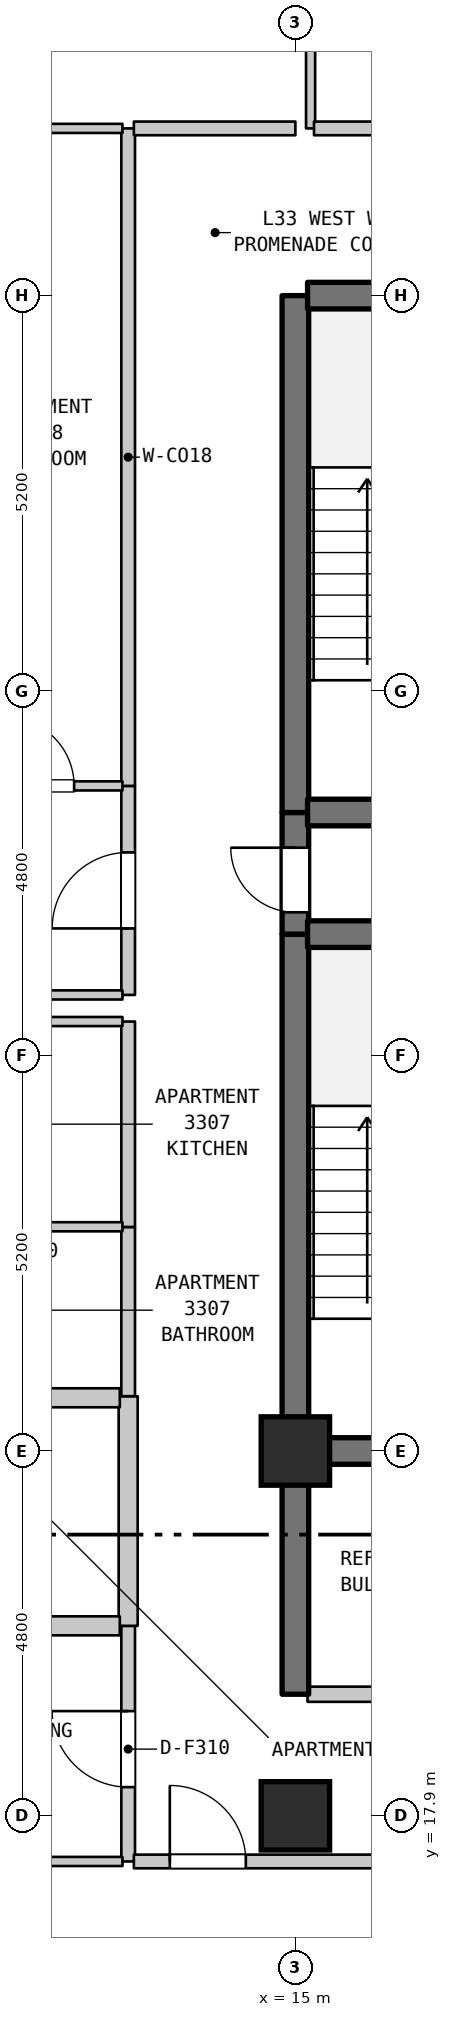
"""IFC4 building model, lengths in metres.
Left out: names, types, materials, properties, quantities, classifications, styles, units other than length and angle.
Written with IfcOpenShell. Run it as: python <this file> out.ifc"""

import sys

from ifc_helpers import new_model, si_unit, direction, frame, frame_2d, origin, origin_2d, place, context, subcontext, project, spatial, rectangle, extrude, element, fill, save


model = new_model("IFC4")
c1 = context("Model", 3, precision=1e-05, world=origin(), true_north=direction((0.0, 1.0)))
c2 = subcontext(c1, "Body", "Model", "MODEL_VIEW")
j1 = project(units=[si_unit("LENGTHUNIT", "METRE"), si_unit("PLANEANGLEUNIT", "RADIAN")], contexts=[c1])
p1 = place(None, origin())
s1 = spatial("IfcSite", under=j1, at=p1, CompositionType="ELEMENT")
p2 = place(p1, origin())
s2 = spatial("IfcBuilding", under=s1, at=p2, CompositionType="ELEMENT")
p3 = place(p2, frame((0.0, 0.0, 137.2)))
s3 = spatial("IfcBuildingStorey", under=s2, at=p3, CompositionType="ELEMENT", Elevation=137.2)
for number, where, z_axis, x_axis in (
    (1, (15.0, 17.9, 0.0), (0.0, 0.0, 1.0), (1.0, 0.0, 0.0)),
    (2, (15.0, 22.7, 0.0), (0.0, 0.0, 1.0), (1.0, 0.0, 0.0)),
):
    element("IfcColumn", number, at=place(p3, frame(where, z_axis=z_axis, x_axis=x_axis)), inside=s3, PredefinedType="COLUMN", context=c2, shape_type="SweptSolid", body=[
        extrude(rectangle(XDim=0.9, YDim=0.9, at=origin_2d()), origin(), (0.0, 0.0, 1.0), 3.7),
    ])
p4 = place(p3, frame((12.8, 17.3, 0.0), z_axis=(0.0, 0.0, 1.0), x_axis=(0.0, 1.0, 0.0)))
e3 = element("IfcWall", 3, at=p4, inside=s3, PredefinedType="STANDARD", context=c2, shape_type="SweptSolid", body=[
    extrude(rectangle(XDim=3.1, YDim=0.18, at=frame_2d((1.55, 0.0))), origin(), (0.0, 0.0, 1.0), 3.385),
])
p5 = place(p4, frame((0.978, 0.0, 0.0)))
e4 = element("IfcOpeningElement", 4, at=p5, cuts=e3, PredefinedType="OPENING", context=c2, shape_type="SweptSolid", body=[
    extrude(rectangle(XDim=1.0, YDim=2.15, at=frame_2d((0.5, 1.075))), frame((0.0, 0.1, 0.0), z_axis=(0.0, -1.0, 0.0), x_axis=(1.0, 0.0, 0.0)), (0.0, 0.0, 1.0), 0.2),
])
p6 = place(p3, frame((12.8, 20.4, 0.0), z_axis=(0.0, 0.0, 1.0), x_axis=(0.0, 1.0, 0.0)))
e5 = element("IfcWall", 5, at=p6, inside=s3, PredefinedType="STANDARD", context=c2, shape_type="SweptSolid", body=[
    extrude(rectangle(XDim=3.021, YDim=0.25, at=frame_2d((1.51, 0.0))), origin(), (0.0, 0.0, 1.0), 3.385),
])
p7 = place(p3, frame((12.8, 23.421, 0.0), z_axis=(0.0, 0.0, 1.0), x_axis=(0.0, 1.0, 0.0)))
e6 = element("IfcWall", 6, at=p7, inside=s3, PredefinedType="STANDARD", context=c2, shape_type="SweptSolid", body=[
    extrude(rectangle(XDim=2.226, YDim=0.18, at=frame_2d((1.113, 0.0))), origin(), (0.0, 0.0, 1.0), 3.385),
])
p8 = place(p3, frame((12.8, 25.647, 0.0), z_axis=(0.0, 0.0, 1.0), x_axis=(0.0, 1.0, 0.0)))
e7 = element("IfcWall", 7, at=p8, inside=s3, PredefinedType="STANDARD", context=c2, shape_type="SweptSolid", body=[
    extrude(rectangle(XDim=2.703, YDim=0.18, at=frame_2d((1.352, 0.0))), origin(), (0.0, 0.0, 1.0), 3.385),
])
p9 = place(p3, frame((12.8, 28.7, 0.0), z_axis=(0.0, 0.0, 1.0), x_axis=(0.0, 1.0, 0.0)))
e8 = element("IfcWall", 8, at=p9, inside=s3, PredefinedType="STANDARD", context=c2, shape_type="SweptSolid", body=[
    extrude(rectangle(XDim=2.75, YDim=0.18, at=frame_2d((1.375, 0.0))), origin(), (0.0, 0.0, 1.0), 3.385),
])
p10 = place(p9, frame((0.875, 0.0, 0.0)))
e9 = element("IfcOpeningElement", 9, at=p10, cuts=e8, PredefinedType="OPENING", context=c2, shape_type="SweptSolid", body=[
    extrude(rectangle(XDim=1.0, YDim=2.15, at=frame_2d((0.5, 1.075))), frame((0.0, 0.1, 0.0), z_axis=(0.0, -1.0, 0.0), x_axis=(1.0, 0.0, 0.0)), (0.0, 0.0, 1.0), 0.2),
])
p11 = place(p3, frame((12.8, 31.45, 0.0), z_axis=(0.0, 0.0, 1.0), x_axis=(0.0, 1.0, 0.0)))
e10 = element("IfcWall", 10, at=p11, inside=s3, PredefinedType="STANDARD", context=c2, shape_type="SweptSolid", body=[
    extrude(rectangle(XDim=8.65, YDim=0.18, at=frame_2d((4.325, 0.0))), origin(), (0.0, 0.0, 1.0), 3.385),
])
p12 = place(p3, frame((15.0, 19.5, 0.0), z_axis=(0.0, 0.0, 1.0), x_axis=(0.0, 1.0, 0.0)))
e11 = element("IfcWall", 11, at=p12, inside=s3, PredefinedType="SHEAR", context=c2, shape_type="SweptSolid", body=[
    extrude(rectangle(XDim=3.2, YDim=0.35, at=frame_2d((1.6, 0.0))), origin(), (0.0, 0.0, 1.0), 3.385),
])
p13 = place(p3, frame((15.0, 22.7, 0.0), z_axis=(0.0, 0.0, 1.0), x_axis=(0.0, 1.0, 0.0)))
e12 = element("IfcWall", 12, at=p13, inside=s3, PredefinedType="SHEAR", context=c2, shape_type="SweptSolid", body=[
    extrude(rectangle(XDim=6.8, YDim=0.35, at=frame_2d((3.4, 0.0))), origin(), (0.0, 0.0, 1.0), 3.385),
])
p14 = place(p3, frame((15.0, 29.5, 0.0), z_axis=(0.0, 0.0, 1.0), x_axis=(0.0, 1.0, 0.0)))
e13 = element("IfcWall", 13, at=p14, inside=s3, PredefinedType="SHEAR", context=c2, shape_type="SweptSolid", body=[
    extrude(rectangle(XDim=1.6, YDim=0.35, at=frame_2d((0.8, 0.0))), origin(), (0.0, 0.0, 1.0), 3.385),
])
p15 = place(p14, frame((0.287, 0.0, 0.0)))
e14 = element("IfcOpeningElement", 14, at=p15, cuts=e13, PredefinedType="OPENING", context=c2, shape_type="SweptSolid", body=[
    extrude(rectangle(XDim=0.85, YDim=2.1, at=frame_2d((0.425, 1.05))), frame((0.0, 0.185, 0.0), z_axis=(0.0, -1.0, 0.0), x_axis=(1.0, 0.0, 0.0)), (0.0, 0.0, 1.0), 0.37),
])
p16 = place(p3, frame((15.0, 31.1, 0.0), z_axis=(0.0, 0.0, 1.0), x_axis=(0.0, 1.0, 0.0)))
e15 = element("IfcWall", 15, at=p16, inside=s3, PredefinedType="SHEAR", context=c2, shape_type="SweptSolid", body=[
    extrude(rectangle(XDim=6.8, YDim=0.35, at=frame_2d((3.4, 0.0))), origin(), (0.0, 0.0, 1.0), 3.385),
])
p17 = place(p3, frame((15.2, 40.1, 0.0), z_axis=(0.0, 0.0, 1.0), x_axis=(0.0, 1.0, 0.0)))
e16 = element("IfcWall", 16, at=p17, inside=s3, PredefinedType="PARTITIONING", context=c2, shape_type="SweptSolid", body=[
    extrude(rectangle(XDim=3.2, YDim=0.12, at=frame_2d((1.6, 0.0))), origin(), (0.0, 0.0, 1.0), 3.385),
])
p18 = place(p3, frame((9.085, 17.3, 0.0), z_axis=(0.0, 0.0, 1.0), x_axis=(1.0, 0.0, 0.0)))
e17 = element("IfcWall", 17, at=p18, inside=s3, PredefinedType="PARTITIONING", context=c2, shape_type="SweptSolid", body=[
    extrude(rectangle(XDim=3.64, YDim=0.12, at=frame_2d((1.82, 0.0))), origin(), (0.0, 0.0, 1.0), 3.385),
])
p19 = place(p3, frame((12.875, 17.3, 0.0), z_axis=(0.0, 0.0, 1.0), x_axis=(1.0, 0.0, 0.0)))
e18 = element("IfcWall", 18, at=p19, inside=s3, PredefinedType="STANDARD", context=c2, shape_type="SweptSolid", body=[
    extrude(rectangle(XDim=3.58, YDim=0.18, at=frame_2d((1.79, 0.0))), origin(), (0.0, 0.0, 1.0), 3.385),
])
p20 = place(p19, frame((0.473, 0.0, 0.0)))
e19 = element("IfcOpeningElement", 19, at=p20, cuts=e18, PredefinedType="OPENING", context=c2, shape_type="SweptSolid", body=[
    extrude(rectangle(XDim=1.0, YDim=2.15, at=frame_2d((0.5, 1.075))), frame((0.0, 0.1, 0.0), z_axis=(0.0, -1.0, 0.0), x_axis=(1.0, 0.0, 0.0)), (0.0, 0.0, 1.0), 0.2),
])
p21 = place(p3, frame((15.16, 19.5, 0.0), z_axis=(0.0, 0.0, 1.0), x_axis=(1.0, 0.0, 0.0)))
e20 = element("IfcWall", 20, at=p21, inside=s3, PredefinedType="STANDARD", context=c2, shape_type="SweptSolid", body=[
    extrude(rectangle(XDim=3.68, YDim=0.2, at=frame_2d((1.84, 0.0))), origin(), (0.0, 0.0, 1.0), 3.385),
])
p22 = place(p21, frame((1.39, 0.0, 0.0)))
e21 = element("IfcOpeningElement", 21, at=p22, cuts=e20, PredefinedType="OPENING", context=c2, shape_type="SweptSolid", body=[
    extrude(rectangle(XDim=0.9, YDim=2.15, at=frame_2d((0.45, 1.075))), frame((0.0, 0.11, 0.0), z_axis=(0.0, -1.0, 0.0), x_axis=(1.0, 0.0, 0.0)), (0.0, 0.0, 1.0), 0.22),
])
p23 = place(p3, frame((10.66, 20.4, 0.0), z_axis=(0.0, 0.0, 1.0), x_axis=(1.0, 0.0, 0.0)))
e22 = element("IfcWall", 22, at=p23, inside=s3, PredefinedType="STANDARD", context=c2, shape_type="SweptSolid", body=[
    extrude(rectangle(XDim=2.03, YDim=0.25, at=frame_2d((1.015, 0.0))), origin(), (0.0, 0.0, 1.0), 3.385),
])
p24 = place(p3, frame((15.16, 22.7, 0.0), z_axis=(0.0, 0.0, 1.0), x_axis=(1.0, 0.0, 0.0)))
e23 = element("IfcWall", 23, at=p24, inside=s3, PredefinedType="SHEAR", context=c2, shape_type="SweptSolid", body=[
    extrude(rectangle(XDim=3.68, YDim=0.35, at=frame_2d((1.84, 0.0))), origin(), (0.0, 0.0, 1.0), 3.385),
])
p25 = place(p3, frame((10.66, 23.4, 0.0), z_axis=(0.0, 0.0, 1.0), x_axis=(1.0, 0.0, 0.0)))
e24 = element("IfcWall", 24, at=p25, inside=s3, PredefinedType="STANDARD", context=c2, shape_type="SweptSolid", body=[
    extrude(rectangle(XDim=2.03, YDim=0.25, at=frame_2d((1.015, 0.0))), origin(), (0.0, 0.0, 1.0), 3.385),
])
for number, where, z_axis, x_axis in (
    (25, (10.595, 25.65, 0.0), (0.0, 0.0, 1.0), (1.0, 0.0, 0.0)),
    (26, (10.595, 28.35, 0.0), (0.0, 0.0, 1.0), (1.0, 0.0, 0.0)),
):
    element("IfcWall", number, at=place(p3, frame(where, z_axis=z_axis, x_axis=x_axis)), inside=s3, PredefinedType="PARTITIONING", context=c2, shape_type="SweptSolid", body=[
        extrude(rectangle(XDim=2.13, YDim=0.12, at=frame_2d((1.065, 0.0))), origin(), (0.0, 0.0, 1.0), 3.385),
    ])
p26 = place(p3, frame((9.03, 28.7, 0.0), z_axis=(0.0, 0.0, 1.0), x_axis=(1.0, 0.0, 0.0)))
e27 = element("IfcWall", 27, at=p26, inside=s3, PredefinedType="PARTITIONING", context=c2, shape_type="SweptSolid", body=[
    extrude(rectangle(XDim=3.695, YDim=0.12, at=frame_2d((1.848, 0.0))), origin(), (0.0, 0.0, 1.0), 3.385),
])
for number, where, z_axis, x_axis in (
    (28, (15.16, 29.5, 0.0), (0.0, 0.0, 1.0), (1.0, 0.0, 0.0)),
    (29, (15.16, 31.1, 0.0), (0.0, 0.0, 1.0), (1.0, 0.0, 0.0)),
):
    element("IfcWall", number, at=place(p3, frame(where, z_axis=z_axis, x_axis=x_axis)), inside=s3, PredefinedType="SHEAR", context=c2, shape_type="SweptSolid", body=[
        extrude(rectangle(XDim=3.68, YDim=0.35, at=frame_2d((1.84, 0.0))), origin(), (0.0, 0.0, 1.0), 3.385),
    ])
p27 = place(p3, frame((10.523, 31.45, 0.0), z_axis=(0.0, 0.0, 1.0), x_axis=(1.0, 0.0, 0.0)))
e30 = element("IfcWall", 30, at=p27, inside=s3, PredefinedType="PARTITIONING", context=c2, shape_type="SweptSolid", body=[
    extrude(rectangle(XDim=2.202, YDim=0.12, at=frame_2d((1.101, 0.0))), origin(), (0.0, 0.0, 1.0), 3.385),
])
p28 = place(p27, frame((0.666, 0.0, 0.0)))
e31 = element("IfcOpeningElement", 31, at=p28, cuts=e30, PredefinedType="OPENING", context=c2, shape_type="SweptSolid", body=[
    extrude(rectangle(XDim=0.9, YDim=2.1, at=frame_2d((0.45, 1.05))), frame((0.0, 0.07, 0.0), z_axis=(0.0, -1.0, 0.0), x_axis=(1.0, 0.0, 0.0)), (0.0, 0.0, 1.0), 0.14),
])
p29 = place(p3, frame((15.16, 37.9, 0.0), z_axis=(0.0, 0.0, 1.0), x_axis=(1.0, 0.0, 0.0)))
e32 = element("IfcWall", 32, at=p29, inside=s3, PredefinedType="SHEAR", context=c2, shape_type="SweptSolid", body=[
    extrude(rectangle(XDim=3.68, YDim=0.35, at=frame_2d((1.84, 0.0))), origin(), (0.0, 0.0, 1.0), 3.385),
])
p30 = place(p3, frame((10.523, 40.1, 0.0), z_axis=(0.0, 0.0, 1.0), x_axis=(1.0, 0.0, 0.0)))
e33 = element("IfcWall", 33, at=p30, inside=s3, PredefinedType="PARTITIONING", context=c2, shape_type="SweptSolid", body=[
    extrude(rectangle(XDim=2.202, YDim=0.12, at=frame_2d((1.101, 0.0))), origin(), (0.0, 0.0, 1.0), 3.385),
])
p31 = place(p3, frame((12.875, 40.1, 0.0), z_axis=(0.0, 0.0, 1.0), x_axis=(1.0, 0.0, 0.0)))
e34 = element("IfcWall", 34, at=p31, inside=s3, PredefinedType="STANDARD", context=c2, shape_type="SweptSolid", body=[
    extrude(rectangle(XDim=2.125, YDim=0.18, at=frame_2d((1.062, 0.0))), origin(), (0.0, 0.0, 1.0), 3.385),
])
p32 = place(p3, frame((15.245, 40.1, 0.0), z_axis=(0.0, 0.0, 1.0), x_axis=(1.0, 0.0, 0.0)))
e35 = element("IfcWall", 35, at=p32, inside=s3, PredefinedType="STANDARD", context=c2, shape_type="SweptSolid", body=[
    extrude(rectangle(XDim=2.61, YDim=0.18, at=frame_2d((1.305, 0.0))), origin(), (0.0, 0.0, 1.0), 3.385),
])
p33 = place(p5, origin())
e36 = element("IfcDoor", 36, at=p33, inside=s3, OperationType="SINGLE_SWING_RIGHT", PredefinedType="DOOR", context=c2, shape_type="SweptSolid", body=[
    extrude(rectangle(XDim=1.0, YDim=2.15, at=frame_2d((0.5, 1.075))), frame((0.0, 0.025, 0.0), z_axis=(0.0, -1.0, 0.0), x_axis=(1.0, 0.0, 0.0)), (0.0, 0.0, 1.0), 0.05),
])
fill(e4, e36)
p34 = place(p10, origin())
e37 = element("IfcDoor", 37, at=p34, inside=s3, OperationType="SINGLE_SWING_LEFT", PredefinedType="DOOR", context=c2, shape_type="SweptSolid", body=[
    extrude(rectangle(XDim=1.0, YDim=2.15, at=frame_2d((0.5, 1.075))), frame((0.0, 0.025, 0.0), z_axis=(0.0, -1.0, 0.0), x_axis=(1.0, 0.0, 0.0)), (0.0, 0.0, 1.0), 0.05),
])
fill(e9, e37)
p35 = place(p15, origin())
e38 = element("IfcDoor", 38, at=p35, inside=s3, OperationType="SINGLE_SWING_RIGHT", PredefinedType="DOOR", context=c2, shape_type="SweptSolid", body=[
    extrude(rectangle(XDim=0.85, YDim=2.1, at=frame_2d((0.425, 1.05))), frame((0.0, 0.025, 0.0), z_axis=(0.0, -1.0, 0.0), x_axis=(1.0, 0.0, 0.0)), (0.0, 0.0, 1.0), 0.05),
])
fill(e14, e38)
p36 = place(p20, origin())
e39 = element("IfcDoor", 39, at=p36, inside=s3, OperationType="SINGLE_SWING_LEFT", PredefinedType="DOOR", context=c2, shape_type="SweptSolid", body=[
    extrude(rectangle(XDim=1.0, YDim=2.15, at=frame_2d((0.5, 1.075))), frame((0.0, 0.025, 0.0), z_axis=(0.0, -1.0, 0.0), x_axis=(1.0, 0.0, 0.0)), (0.0, 0.0, 1.0), 0.05),
])
fill(e19, e39)
p37 = place(p28, origin())
e40 = element("IfcDoor", 40, at=p37, inside=s3, OperationType="SINGLE_SWING_LEFT", PredefinedType="DOOR", context=c2, shape_type="SweptSolid", body=[
    extrude(rectangle(XDim=0.9, YDim=2.1, at=frame_2d((0.45, 1.05))), frame((0.0, 0.025, 0.0), z_axis=(0.0, -1.0, 0.0), x_axis=(1.0, 0.0, 0.0)), (0.0, 0.0, 1.0), 0.05),
])
fill(e31, e40)
save(model, sys.argv[1])
